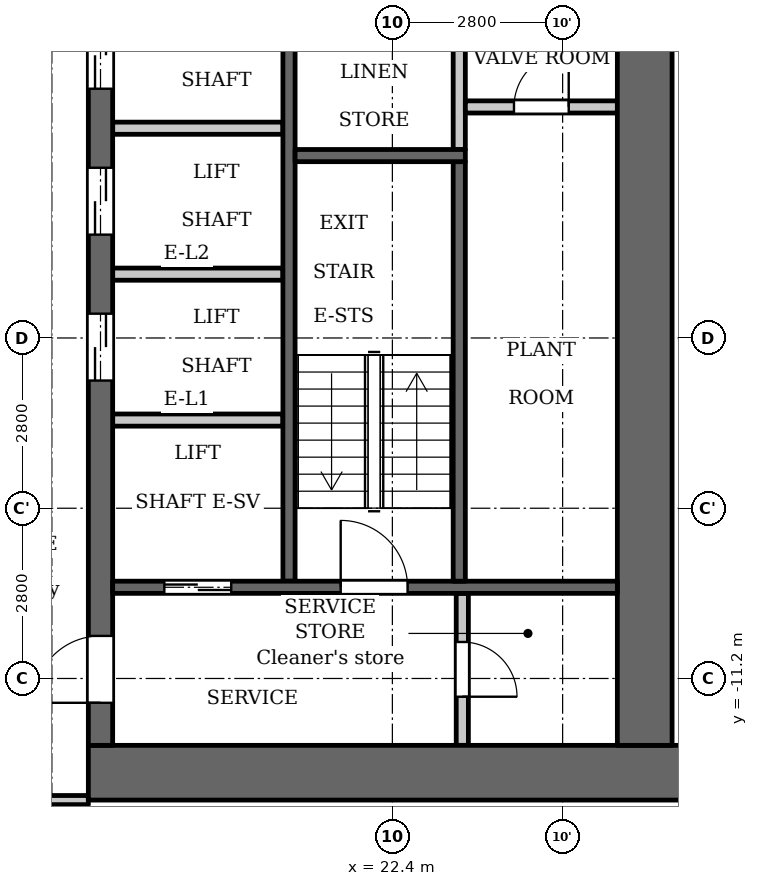
"""IFC4 building model, lengths in metres.
Left out: names, types, materials, properties, quantities, classifications, styles, units other than length and angle.
Written with IfcOpenShell. Run it as: python <this file> out.ifc"""

import sys

from ifc_helpers import new_model, si_unit, direction, frame, frame_2d, origin, place, context, subcontext, project, spatial, rectangle, extrude, element, fill, save


model = new_model("IFC4")
c1 = context("Model", 3, precision=1e-05, world=origin(), true_north=direction((0.0, 1.0)))
c2 = subcontext(c1, "Body", "Model", "MODEL_VIEW")
j1 = project(units=[si_unit("LENGTHUNIT", "METRE"), si_unit("PLANEANGLEUNIT", "RADIAN")], contexts=[c1])
p1 = place(None, origin())
s1 = spatial("IfcSite", under=j1, at=p1, CompositionType="ELEMENT")
p2 = place(p1, origin())
s2 = spatial("IfcBuilding", under=s1, at=p2, CompositionType="ELEMENT")
p3 = place(p2, frame((0.0, 0.0, 30.5)))
s3 = spatial("IfcBuildingStorey", under=s2, at=p3, CompositionType="ELEMENT", Elevation=30.5)
p4 = place(p3, frame((23.5, -2.5, 0.0), z_axis=(0.0, 0.0, 1.0), x_axis=(0.0, 1.0, 0.0)))
e1 = element("IfcWall", 1, at=p4, inside=s3, PredefinedType="PARTITIONING", context=c2, shape_type="SweptSolid", body=[
    extrude(rectangle(XDim=2.65, YDim=0.2, at=frame_2d((1.325, 0.0))), origin(), (0.0, 0.0, 1.0), 3.2),
])
p5 = place(p3, frame((20.7, -9.6, 0.0), z_axis=(0.0, 0.0, 1.0), x_axis=(0.0, 1.0, 0.0)))
e2 = element("IfcWall", 2, at=p5, inside=s3, PredefinedType="SHEAR", context=c2, shape_type="SweptSolid", body=[
    extrude(rectangle(XDim=9.75, YDim=0.2, at=frame_2d((4.875, 0.0))), origin(), (0.0, 0.0, 1.0), 3.2),
])
p6 = place(p3, frame((17.4, -12.75, 0.0), z_axis=(0.0, 0.0, 1.0), x_axis=(1.0, 0.0, 0.0)))
e3 = element("IfcWall", 3, at=p6, inside=s3, PredefinedType="SHEAR", context=c2, shape_type="SweptSolid", body=[
    extrude(rectangle(XDim=10.4, YDim=0.9, at=frame_2d((5.2, 0.0))), origin(), (0.0, 0.0, 1.0), 3.2),
])
p7 = place(p3, frame((17.6, -12.3, 0.0), z_axis=(0.0, 0.0, 1.0), x_axis=(0.0, 1.0, 0.0)))
e4 = element("IfcWall", 4, at=p7, inside=s3, PredefinedType="SHEAR", context=c2, shape_type="SweptSolid", body=[
    extrude(rectangle(XDim=24.6, YDim=0.4, at=frame_2d((12.3, 0.0))), origin(), (0.0, 0.0, 1.0), 3.2),
])
p8 = place(p7, frame((6.0, 0.0, 0.0)))
e5 = element("IfcOpeningElement", 5, at=p8, cuts=e4, PredefinedType="OPENING", context=c2, shape_type="SweptSolid", body=[
    extrude(rectangle(XDim=1.1, YDim=2.1, at=frame_2d((0.55, 1.05))), frame((0.0, 0.21, 0.0), z_axis=(0.0, -1.0, 0.0), x_axis=(1.0, 0.0, 0.0)), (0.0, 0.0, 1.0), 0.42),
])
p9 = place(p7, frame((8.4, 0.0, 0.0)))
e6 = element("IfcOpeningElement", 6, at=p9, cuts=e4, PredefinedType="OPENING", context=c2, shape_type="SweptSolid", body=[
    extrude(rectangle(XDim=1.1, YDim=2.1, at=frame_2d((0.55, 1.05))), frame((0.0, 0.21, 0.0), z_axis=(0.0, -1.0, 0.0), x_axis=(1.0, 0.0, 0.0)), (0.0, 0.0, 1.0), 0.42),
])
p10 = place(p7, frame((10.8, 0.0, 0.0)))
e7 = element("IfcOpeningElement", 7, at=p10, cuts=e4, PredefinedType="OPENING", context=c2, shape_type="SweptSolid", body=[
    extrude(rectangle(XDim=1.1, YDim=2.1, at=frame_2d((0.55, 1.05))), frame((0.0, 0.21, 0.0), z_axis=(0.0, -1.0, 0.0), x_axis=(1.0, 0.0, 0.0)), (0.0, 0.0, 1.0), 0.42),
])
p11 = place(p7, frame((16.75, 0.0, 0.0)))
e8 = element("IfcOpeningElement", 8, at=p11, cuts=e4, PredefinedType="OPENING", context=c2, shape_type="SweptSolid", body=[
    extrude(rectangle(XDim=0.9, YDim=2.1, at=frame_2d((0.45, 1.05))), frame((0.0, 0.21, 0.0), z_axis=(0.0, -1.0, 0.0), x_axis=(1.0, 0.0, 0.0)), (0.0, 0.0, 1.0), 0.42),
])
p12 = place(p7, frame((22.8, 0.0, 0.0)))
e9 = element("IfcOpeningElement", 9, at=p12, cuts=e4, PredefinedType="OPENING", context=c2, shape_type="SweptSolid", body=[
    extrude(rectangle(XDim=1.1, YDim=2.1, at=frame_2d((0.55, 1.05))), frame((0.0, 0.21, 0.0), z_axis=(0.0, -1.0, 0.0), x_axis=(1.0, 0.0, 0.0)), (0.0, 0.0, 1.0), 0.42),
])
p13 = place(p7, frame((0.7, 0.0, 0.0)))
e10 = element("IfcOpeningElement", 10, at=p13, cuts=e4, PredefinedType="OPENING", context=c2, shape_type="SweptSolid", body=[
    extrude(rectangle(XDim=1.1, YDim=2.1, at=frame_2d((0.55, 1.05))), frame((0.0, 0.21, 0.0), z_axis=(0.0, -1.0, 0.0), x_axis=(1.0, 0.0, 0.0)), (0.0, 0.0, 1.0), 0.42),
])
p14 = place(p7, frame((12.775, 0.0, 0.0)))
e11 = element("IfcOpeningElement", 11, at=p14, cuts=e4, PredefinedType="OPENING", context=c2, shape_type="SweptSolid", body=[
    extrude(rectangle(XDim=1.8, YDim=2.1, at=frame_2d((0.9, 1.05))), frame((0.0, 0.21, 0.0), z_axis=(0.0, -1.0, 0.0), x_axis=(1.0, 0.0, 0.0)), (0.0, 0.0, 1.0), 0.42),
])
p15 = place(p3, frame((26.55, -12.3, 0.0), z_axis=(0.0, 0.0, 1.0), x_axis=(0.0, 1.0, 0.0)))
e12 = element("IfcWall", 12, at=p15, inside=s3, PredefinedType="SHEAR", context=c2, shape_type="SweptSolid", body=[
    extrude(rectangle(XDim=24.6, YDim=0.9, at=frame_2d((12.3, 0.0))), origin(), (0.0, 0.0, 1.0), 3.2),
])
p16 = place(p3, frame((23.55, -12.3, 0.0), z_axis=(0.0, 0.0, 1.0), x_axis=(0.0, 1.0, 0.0)))
e13 = element("IfcWall", 13, at=p16, inside=s3, PredefinedType="PARTITIONING", context=c2, shape_type="SweptSolid", body=[
    extrude(rectangle(XDim=2.5, YDim=0.2, at=frame_2d((1.25, 0.0))), origin(), (0.0, 0.0, 1.0), 3.2),
])
p17 = place(p16, frame((0.8, 0.0, 0.0)))
e14 = element("IfcOpeningElement", 14, at=p17, cuts=e13, PredefinedType="OPENING", context=c2, shape_type="SweptSolid", body=[
    extrude(rectangle(XDim=0.9, YDim=2.1, at=frame_2d((0.45, 1.05))), frame((0.0, 0.11, 0.0), z_axis=(0.0, -1.0, 0.0), x_axis=(1.0, 0.0, 0.0)), (0.0, 0.0, 1.0), 0.22),
])
p18 = place(p3, frame((23.6, -1.8, 0.0), z_axis=(0.0, 0.0, 1.0), x_axis=(1.0, 0.0, 0.0)))
e15 = element("IfcWall", 15, at=p18, inside=s3, PredefinedType="PARTITIONING", context=c2, shape_type="SweptSolid", body=[
    extrude(rectangle(XDim=2.5, YDim=0.2, at=frame_2d((1.25, 0.0))), origin(), (0.0, 0.0, 1.0), 3.2),
])
p19 = place(p18, frame((0.8, 0.0, 0.0)))
e16 = element("IfcOpeningElement", 16, at=p19, cuts=e15, PredefinedType="OPENING", context=c2, shape_type="SweptSolid", body=[
    extrude(rectangle(XDim=0.9, YDim=2.1, at=frame_2d((0.45, 1.05))), frame((0.0, 0.11, 0.0), z_axis=(0.0, -1.0, 0.0), x_axis=(1.0, 0.0, 0.0)), (0.0, 0.0, 1.0), 0.22),
])
p20 = place(p3, frame((17.8, -9.7, 0.0), z_axis=(0.0, 0.0, 1.0), x_axis=(1.0, 0.0, 0.0)))
e17 = element("IfcWall", 17, at=p20, inside=s3, PredefinedType="SHEAR", context=c2, shape_type="SweptSolid", body=[
    extrude(rectangle(XDim=8.3, YDim=0.2, at=frame_2d((4.15, 0.0))), origin(), (0.0, 0.0, 1.0), 3.2),
])
p21 = place(p20, frame((0.85, 0.0, 0.0)))
e18 = element("IfcOpeningElement", 18, at=p21, cuts=e17, PredefinedType="OPENING", context=c2, shape_type="SweptSolid", body=[
    extrude(rectangle(XDim=1.1, YDim=2.1, at=frame_2d((0.55, 1.05))), frame((0.0, 0.11, 0.0), z_axis=(0.0, -1.0, 0.0), x_axis=(1.0, 0.0, 0.0)), (0.0, 0.0, 1.0), 0.22),
])
p22 = place(p20, frame((3.75, 0.0, 0.0)))
e19 = element("IfcOpeningElement", 19, at=p22, cuts=e17, PredefinedType="OPENING", context=c2, shape_type="SweptSolid", body=[
    extrude(rectangle(XDim=1.1, YDim=2.1, at=frame_2d((0.55, 1.05))), frame((0.0, 0.11, 0.0), z_axis=(0.0, -1.0, 0.0), x_axis=(1.0, 0.0, 0.0)), (0.0, 0.0, 1.0), 0.22),
])
for number, where, z_axis, x_axis in (
    (20, (17.8, -6.95, 0.0), (0.0, 0.0, 1.0), (1.0, 0.0, 0.0)),
    (21, (17.8, -4.55, 0.0), (0.0, 0.0, 1.0), (1.0, 0.0, 0.0)),
    (22, (17.8, -2.15, 0.0), (0.0, 0.0, 1.0), (1.0, 0.0, 0.0)),
):
    element("IfcWall", number, at=place(p3, frame(where, z_axis=z_axis, x_axis=x_axis)), inside=s3, PredefinedType="PARTITIONING", context=c2, shape_type="SweptSolid", body=[
        extrude(rectangle(XDim=2.8, YDim=0.2, at=frame_2d((1.4, 0.0))), origin(), (0.0, 0.0, 1.0), 3.2),
    ])
p23 = place(p3, frame((23.5, -9.6, 0.0), z_axis=(0.0, 0.0, 1.0), x_axis=(0.0, 1.0, 0.0)))
e23 = element("IfcWall", 23, at=p23, inside=s3, PredefinedType="SHEAR", context=c2, shape_type="SweptSolid", body=[
    extrude(rectangle(XDim=6.9, YDim=0.2, at=frame_2d((3.45, 0.0))), origin(), (0.0, 0.0, 1.0), 3.2),
])
p24 = place(p3, frame((20.8, -2.6, 0.0), z_axis=(0.0, 0.0, 1.0), x_axis=(1.0, 0.0, 0.0)))
e24 = element("IfcWall", 24, at=p24, inside=s3, PredefinedType="SHEAR", context=c2, shape_type="SweptSolid", body=[
    extrude(rectangle(XDim=2.8, YDim=0.2, at=frame_2d((1.4, 0.0))), origin(), (0.0, 0.0, 1.0), 3.2),
])
p25 = place(p3, frame((-17.4, -13.2, 0.0), z_axis=(0.0, 0.0, 1.0), x_axis=(1.0, 0.0, 0.0)))
e25 = element("IfcWall", 25, at=p25, inside=s3, PredefinedType="PARTITIONING", context=c2, shape_type="SweptSolid", body=[
    extrude(rectangle(XDim=34.8, YDim=0.15, at=frame_2d((17.4, 0.0))), origin(), (0.0, 0.0, 1.0), 3.2),
])
p26 = place(p25, frame((0.65, 0.0, 0.0)))
e26 = element("IfcOpeningElement", 26, at=p26, cuts=e25, PredefinedType="OPENING", context=c2, shape_type="SweptSolid", body=[
    extrude(rectangle(XDim=1.0, YDim=2.1, at=frame_2d((0.5, 1.05))), frame((0.0, 0.085, 0.0), z_axis=(0.0, -1.0, 0.0), x_axis=(1.0, 0.0, 0.0)), (0.0, 0.0, 1.0), 0.17),
])
p27 = place(p25, frame((33.05, 0.0, 0.0)))
e27 = element("IfcOpeningElement", 27, at=p27, cuts=e25, PredefinedType="OPENING", context=c2, shape_type="SweptSolid", body=[
    extrude(rectangle(XDim=1.0, YDim=2.1, at=frame_2d((0.5, 1.05))), frame((0.0, 0.085, 0.0), z_axis=(0.0, -1.0, 0.0), x_axis=(1.0, 0.0, 0.0)), (0.0, 0.0, 1.0), 0.17),
])
p28 = place(p25, frame((4.55, 0.0, 0.0)))
e28 = element("IfcOpeningElement", 28, at=p28, cuts=e25, PredefinedType="OPENING", context=c2, shape_type="SweptSolid", body=[
    extrude(rectangle(XDim=1.0, YDim=2.1, at=frame_2d((0.5, 1.05))), frame((0.0, 0.085, 0.0), z_axis=(0.0, -1.0, 0.0), x_axis=(1.0, 0.0, 0.0)), (0.0, 0.0, 1.0), 0.17),
])
p29 = place(p25, frame((6.9, 0.0, 0.0)))
e29 = element("IfcOpeningElement", 29, at=p29, cuts=e25, PredefinedType="OPENING", context=c2, shape_type="SweptSolid", body=[
    extrude(rectangle(XDim=1.0, YDim=2.1, at=frame_2d((0.5, 1.05))), frame((0.0, 0.085, 0.0), z_axis=(0.0, -1.0, 0.0), x_axis=(1.0, 0.0, 0.0)), (0.0, 0.0, 1.0), 0.17),
])
p30 = place(p25, frame((15.75, 0.0, 0.0)))
e30 = element("IfcOpeningElement", 30, at=p30, cuts=e25, PredefinedType="OPENING", context=c2, shape_type="SweptSolid", body=[
    extrude(rectangle(XDim=1.0, YDim=2.1, at=frame_2d((0.5, 1.05))), frame((0.0, 0.085, 0.0), z_axis=(0.0, -1.0, 0.0), x_axis=(1.0, 0.0, 0.0)), (0.0, 0.0, 1.0), 0.17),
])
p31 = place(p25, frame((18.1, 0.0, 0.0)))
e31 = element("IfcOpeningElement", 31, at=p31, cuts=e25, PredefinedType="OPENING", context=c2, shape_type="SweptSolid", body=[
    extrude(rectangle(XDim=1.0, YDim=2.1, at=frame_2d((0.5, 1.05))), frame((0.0, 0.085, 0.0), z_axis=(0.0, -1.0, 0.0), x_axis=(1.0, 0.0, 0.0)), (0.0, 0.0, 1.0), 0.17),
])
p32 = place(p25, frame((26.95, 0.0, 0.0)))
e32 = element("IfcOpeningElement", 32, at=p32, cuts=e25, PredefinedType="OPENING", context=c2, shape_type="SweptSolid", body=[
    extrude(rectangle(XDim=1.0, YDim=2.1, at=frame_2d((0.5, 1.05))), frame((0.0, 0.085, 0.0), z_axis=(0.0, -1.0, 0.0), x_axis=(1.0, 0.0, 0.0)), (0.0, 0.0, 1.0), 0.17),
])
p33 = place(p25, frame((29.25, 0.0, 0.0)))
e33 = element("IfcOpeningElement", 33, at=p33, cuts=e25, PredefinedType="OPENING", context=c2, shape_type="SweptSolid", body=[
    extrude(rectangle(XDim=1.0, YDim=2.1, at=frame_2d((0.5, 1.05))), frame((0.0, 0.085, 0.0), z_axis=(0.0, -1.0, 0.0), x_axis=(1.0, 0.0, 0.0)), (0.0, 0.0, 1.0), 0.17),
])
p34 = place(p21, origin())
e34 = element("IfcDoor", 34, at=p34, inside=s3, OperationType="DOUBLE_DOOR_SLIDING", PredefinedType="DOOR", context=c2, shape_type="SweptSolid", body=[
    extrude(rectangle(XDim=1.1, YDim=2.1, at=frame_2d((0.55, 1.05))), frame((0.0, 0.025, 0.0), z_axis=(0.0, -1.0, 0.0), x_axis=(1.0, 0.0, 0.0)), (0.0, 0.0, 1.0), 0.05),
])
fill(e18, e34)
p35 = place(p8, origin())
e35 = element("IfcDoor", 35, at=p35, inside=s3, OperationType="DOUBLE_DOOR_SLIDING", PredefinedType="DOOR", context=c2, shape_type="SweptSolid", body=[
    extrude(rectangle(XDim=1.1, YDim=2.1, at=frame_2d((0.55, 1.05))), frame((0.0, 0.025, 0.0), z_axis=(0.0, -1.0, 0.0), x_axis=(1.0, 0.0, 0.0)), (0.0, 0.0, 1.0), 0.05),
])
fill(e5, e35)
p36 = place(p9, origin())
e36 = element("IfcDoor", 36, at=p36, inside=s3, OperationType="DOUBLE_DOOR_SLIDING", PredefinedType="DOOR", context=c2, shape_type="SweptSolid", body=[
    extrude(rectangle(XDim=1.1, YDim=2.1, at=frame_2d((0.55, 1.05))), frame((0.0, 0.025, 0.0), z_axis=(0.0, -1.0, 0.0), x_axis=(1.0, 0.0, 0.0)), (0.0, 0.0, 1.0), 0.05),
])
fill(e6, e36)
p37 = place(p10, origin())
e37 = element("IfcDoor", 37, at=p37, inside=s3, OperationType="DOUBLE_DOOR_SLIDING", PredefinedType="DOOR", context=c2, shape_type="SweptSolid", body=[
    extrude(rectangle(XDim=1.1, YDim=2.1, at=frame_2d((0.55, 1.05))), frame((0.0, 0.025, 0.0), z_axis=(0.0, -1.0, 0.0), x_axis=(1.0, 0.0, 0.0)), (0.0, 0.0, 1.0), 0.05),
])
fill(e7, e37)
p38 = place(p13, origin())
e38 = element("IfcDoor", 38, at=p38, inside=s3, OperationType="SINGLE_SWING_RIGHT", PredefinedType="DOOR", context=c2, shape_type="SweptSolid", body=[
    extrude(rectangle(XDim=1.1, YDim=2.1, at=frame_2d((0.55, 1.05))), frame((0.0, 0.025, 0.0), z_axis=(0.0, -1.0, 0.0), x_axis=(1.0, 0.0, 0.0)), (0.0, 0.0, 1.0), 0.05),
])
fill(e10, e38)
p39 = place(p17, origin())
e39 = element("IfcDoor", 39, at=p39, inside=s3, OperationType="SINGLE_SWING_LEFT", PredefinedType="DOOR", context=c2, shape_type="SweptSolid", body=[
    extrude(rectangle(XDim=0.9, YDim=2.1, at=frame_2d((0.45, 1.05))), frame((0.0, 0.025, 0.0), z_axis=(0.0, -1.0, 0.0), x_axis=(1.0, 0.0, 0.0)), (0.0, 0.0, 1.0), 0.05),
])
fill(e14, e39)
p40 = place(p22, origin())
e40 = element("IfcDoor", 40, at=p40, inside=s3, OperationType="SINGLE_SWING_RIGHT", PredefinedType="DOOR", context=c2, shape_type="SweptSolid", body=[
    extrude(rectangle(XDim=1.1, YDim=2.1, at=frame_2d((0.55, 1.05))), frame((0.0, 0.025, 0.0), z_axis=(0.0, -1.0, 0.0), x_axis=(1.0, 0.0, 0.0)), (0.0, 0.0, 1.0), 0.05),
])
fill(e19, e40)
p41 = place(p19, origin())
e41 = element("IfcDoor", 41, at=p41, inside=s3, OperationType="SINGLE_SWING_LEFT", PredefinedType="DOOR", context=c2, shape_type="SweptSolid", body=[
    extrude(rectangle(XDim=0.9, YDim=2.1, at=frame_2d((0.45, 1.05))), frame((0.0, 0.025, 0.0), z_axis=(0.0, -1.0, 0.0), x_axis=(1.0, 0.0, 0.0)), (0.0, 0.0, 1.0), 0.05),
])
fill(e16, e41)
save(model, sys.argv[1])
